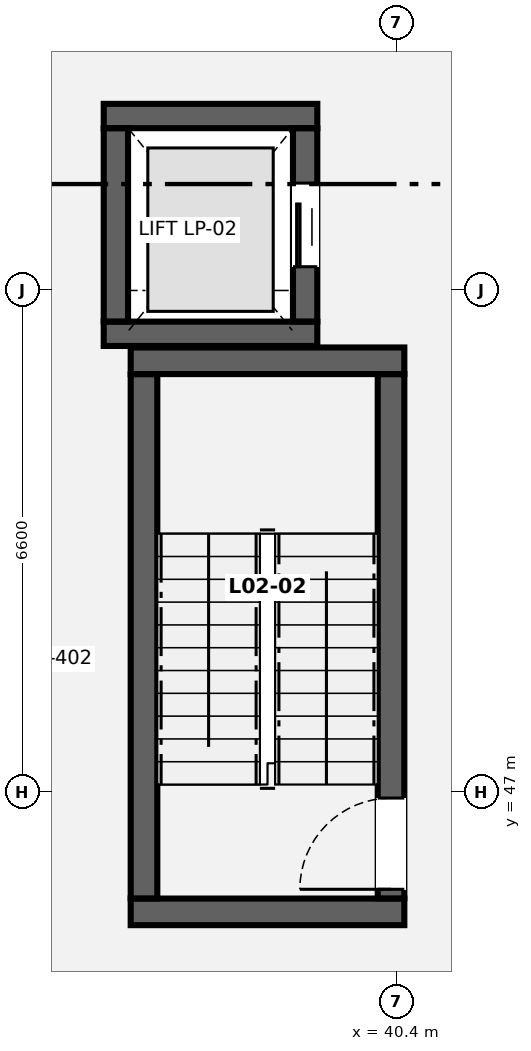
"""IFC4 building model, lengths in metres.
Left out: names, types, materials, properties, quantities, classifications, styles, units other than length and angle.
Written with IfcOpenShell. Run it as: python <this file> out.ifc"""

import sys

from ifc_helpers import new_model, si_unit, direction, frame, frame_2d, origin, place, context, subcontext, project, spatial, rectangle, extrude, element, fill, save


model = new_model("IFC4")
c1 = context("Model", 3, precision=1e-05, world=origin(), true_north=direction((0.0, 1.0)))
c2 = subcontext(c1, "Body", "Model", "MODEL_VIEW")
j1 = project(units=[si_unit("LENGTHUNIT", "METRE"), si_unit("PLANEANGLEUNIT", "RADIAN")], contexts=[c1])
p1 = place(None, origin())
s1 = spatial("IfcSite", under=j1, at=p1, CompositionType="ELEMENT")
p2 = place(p1, origin())
s2 = spatial("IfcBuilding", under=s1, at=p2, CompositionType="ELEMENT")
p3 = place(p2, frame((0.0, 0.0, 9.1)))
s3 = spatial("IfcBuildingStorey", under=s2, at=p3, CompositionType="ELEMENT", Elevation=9.1)
for number, where, z_axis, x_axis in (
    (1, (36.9, 45.425, 0.0), (0.0, 0.0, 1.0), (1.0, 0.0, 0.0)),
    (2, (36.9, 52.675, 0.0), (0.0, 0.0, 1.0), (1.0, 0.0, 0.0)),
):
    element("IfcWall", number, at=place(p3, frame(where, z_axis=z_axis, x_axis=x_axis)), inside=s3, PredefinedType="SHEAR", context=c2, shape_type="SweptSolid", body=[
        extrude(rectangle(XDim=3.6, YDim=0.35, at=frame_2d((1.8, 0.0))), origin(), (0.0, 0.0, 1.0), 4.0),
    ])
p4 = place(p3, frame((37.075, 45.602, 0.0), z_axis=(0.0, 0.0, 1.0), x_axis=(0.0, 1.0, 0.0)))
e3 = element("IfcWall", 3, at=p4, inside=s3, PredefinedType="SHEAR", context=c2, shape_type="SweptSolid", body=[
    extrude(rectangle(XDim=6.896, YDim=0.35, at=frame_2d((3.448, 0.0))), origin(), (0.0, 0.0, 1.0), 4.0),
])
p5 = place(p3, frame((40.325, 45.602, 0.0), z_axis=(0.0, 0.0, 1.0), x_axis=(0.0, 1.0, 0.0)))
e4 = element("IfcWall", 4, at=p5, inside=s3, PredefinedType="SHEAR", context=c2, shape_type="SweptSolid", body=[
    extrude(rectangle(XDim=6.896, YDim=0.35, at=frame_2d((3.448, 0.0))), origin(), (0.0, 0.0, 1.0), 4.0),
])
p6 = place(p5, frame((0.12, 0.0, 0.0)))
e5 = element("IfcOpeningElement", 5, at=p6, cuts=e4, PredefinedType="OPENING", context=c2, shape_type="SweptSolid", body=[
    extrude(rectangle(XDim=1.2, YDim=2.15, at=frame_2d((0.6, 1.075))), frame((0.0, 0.185, 0.0), z_axis=(0.0, -1.0, 0.0), x_axis=(1.0, 0.0, 0.0)), (0.0, 0.0, 1.0), 0.37),
])
for number, where, z_axis, x_axis in (
    (6, (36.545, 53.03, 0.0), (0.0, 0.0, 1.0), (1.0, 0.0, 0.0)),
    (7, (36.545, 55.895, 0.0), (0.0, 0.0, 1.0), (1.0, 0.0, 0.0)),
):
    element("IfcWall", number, at=place(p3, frame(where, z_axis=z_axis, x_axis=x_axis)), inside=s3, PredefinedType="SHEAR", context=c2, shape_type="SweptSolid", body=[
        extrude(rectangle(XDim=2.81, YDim=0.32, at=frame_2d((1.405, 0.0))), origin(), (0.0, 0.0, 1.0), 4.0),
    ])
p7 = place(p3, frame((36.705, 53.192, 0.0), z_axis=(0.0, 0.0, 1.0), x_axis=(0.0, 1.0, 0.0)))
e8 = element("IfcWall", 8, at=p7, inside=s3, PredefinedType="SHEAR", context=c2, shape_type="SweptSolid", body=[
    extrude(rectangle(XDim=2.541, YDim=0.32, at=frame_2d((1.271, 0.0))), origin(), (0.0, 0.0, 1.0), 4.0),
])
p8 = place(p3, frame((39.195, 53.192, 0.0), z_axis=(0.0, 0.0, 1.0), x_axis=(0.0, 1.0, 0.0)))
e9 = element("IfcWall", 9, at=p8, inside=s3, PredefinedType="SHEAR", context=c2, shape_type="SweptSolid", body=[
    extrude(rectangle(XDim=2.541, YDim=0.32, at=frame_2d((1.271, 0.0))), origin(), (0.0, 0.0, 1.0), 4.0),
])
p9 = place(p8, frame((0.72, 0.0, 0.0)))
e10 = element("IfcOpeningElement", 10, at=p9, cuts=e9, PredefinedType="OPENING", context=c2, shape_type="SweptSolid", body=[
    extrude(rectangle(XDim=1.1, YDim=2.15, at=frame_2d((0.55, 1.075))), frame((0.0, 0.17, 0.0), z_axis=(0.0, -1.0, 0.0), x_axis=(1.0, 0.0, 0.0)), (0.0, 0.0, 1.0), 0.34),
])
p10 = place(p6, origin())
e11 = element("IfcDoor", 11, at=p10, inside=s3, OperationType="SINGLE_SWING_LEFT", PredefinedType="DOOR", context=c2, shape_type="SweptSolid", body=[
    extrude(rectangle(XDim=1.2, YDim=2.15, at=frame_2d((0.6, 1.075))), frame((0.0, 0.025, 0.0), z_axis=(0.0, -1.0, 0.0), x_axis=(1.0, 0.0, 0.0)), (0.0, 0.0, 1.0), 0.05),
])
fill(e5, e11)
p11 = place(p9, origin())
e12 = element("IfcDoor", 12, at=p11, inside=s3, OperationType="SLIDING_TO_LEFT", PredefinedType="DOOR", context=c2, shape_type="SweptSolid", body=[
    extrude(rectangle(XDim=1.1, YDim=2.15, at=frame_2d((0.55, 1.075))), frame((0.0, 0.025, 0.0), z_axis=(0.0, -1.0, 0.0), x_axis=(1.0, 0.0, 0.0)), (0.0, 0.0, 1.0), 0.05),
])
fill(e10, e12)
save(model, sys.argv[1])
